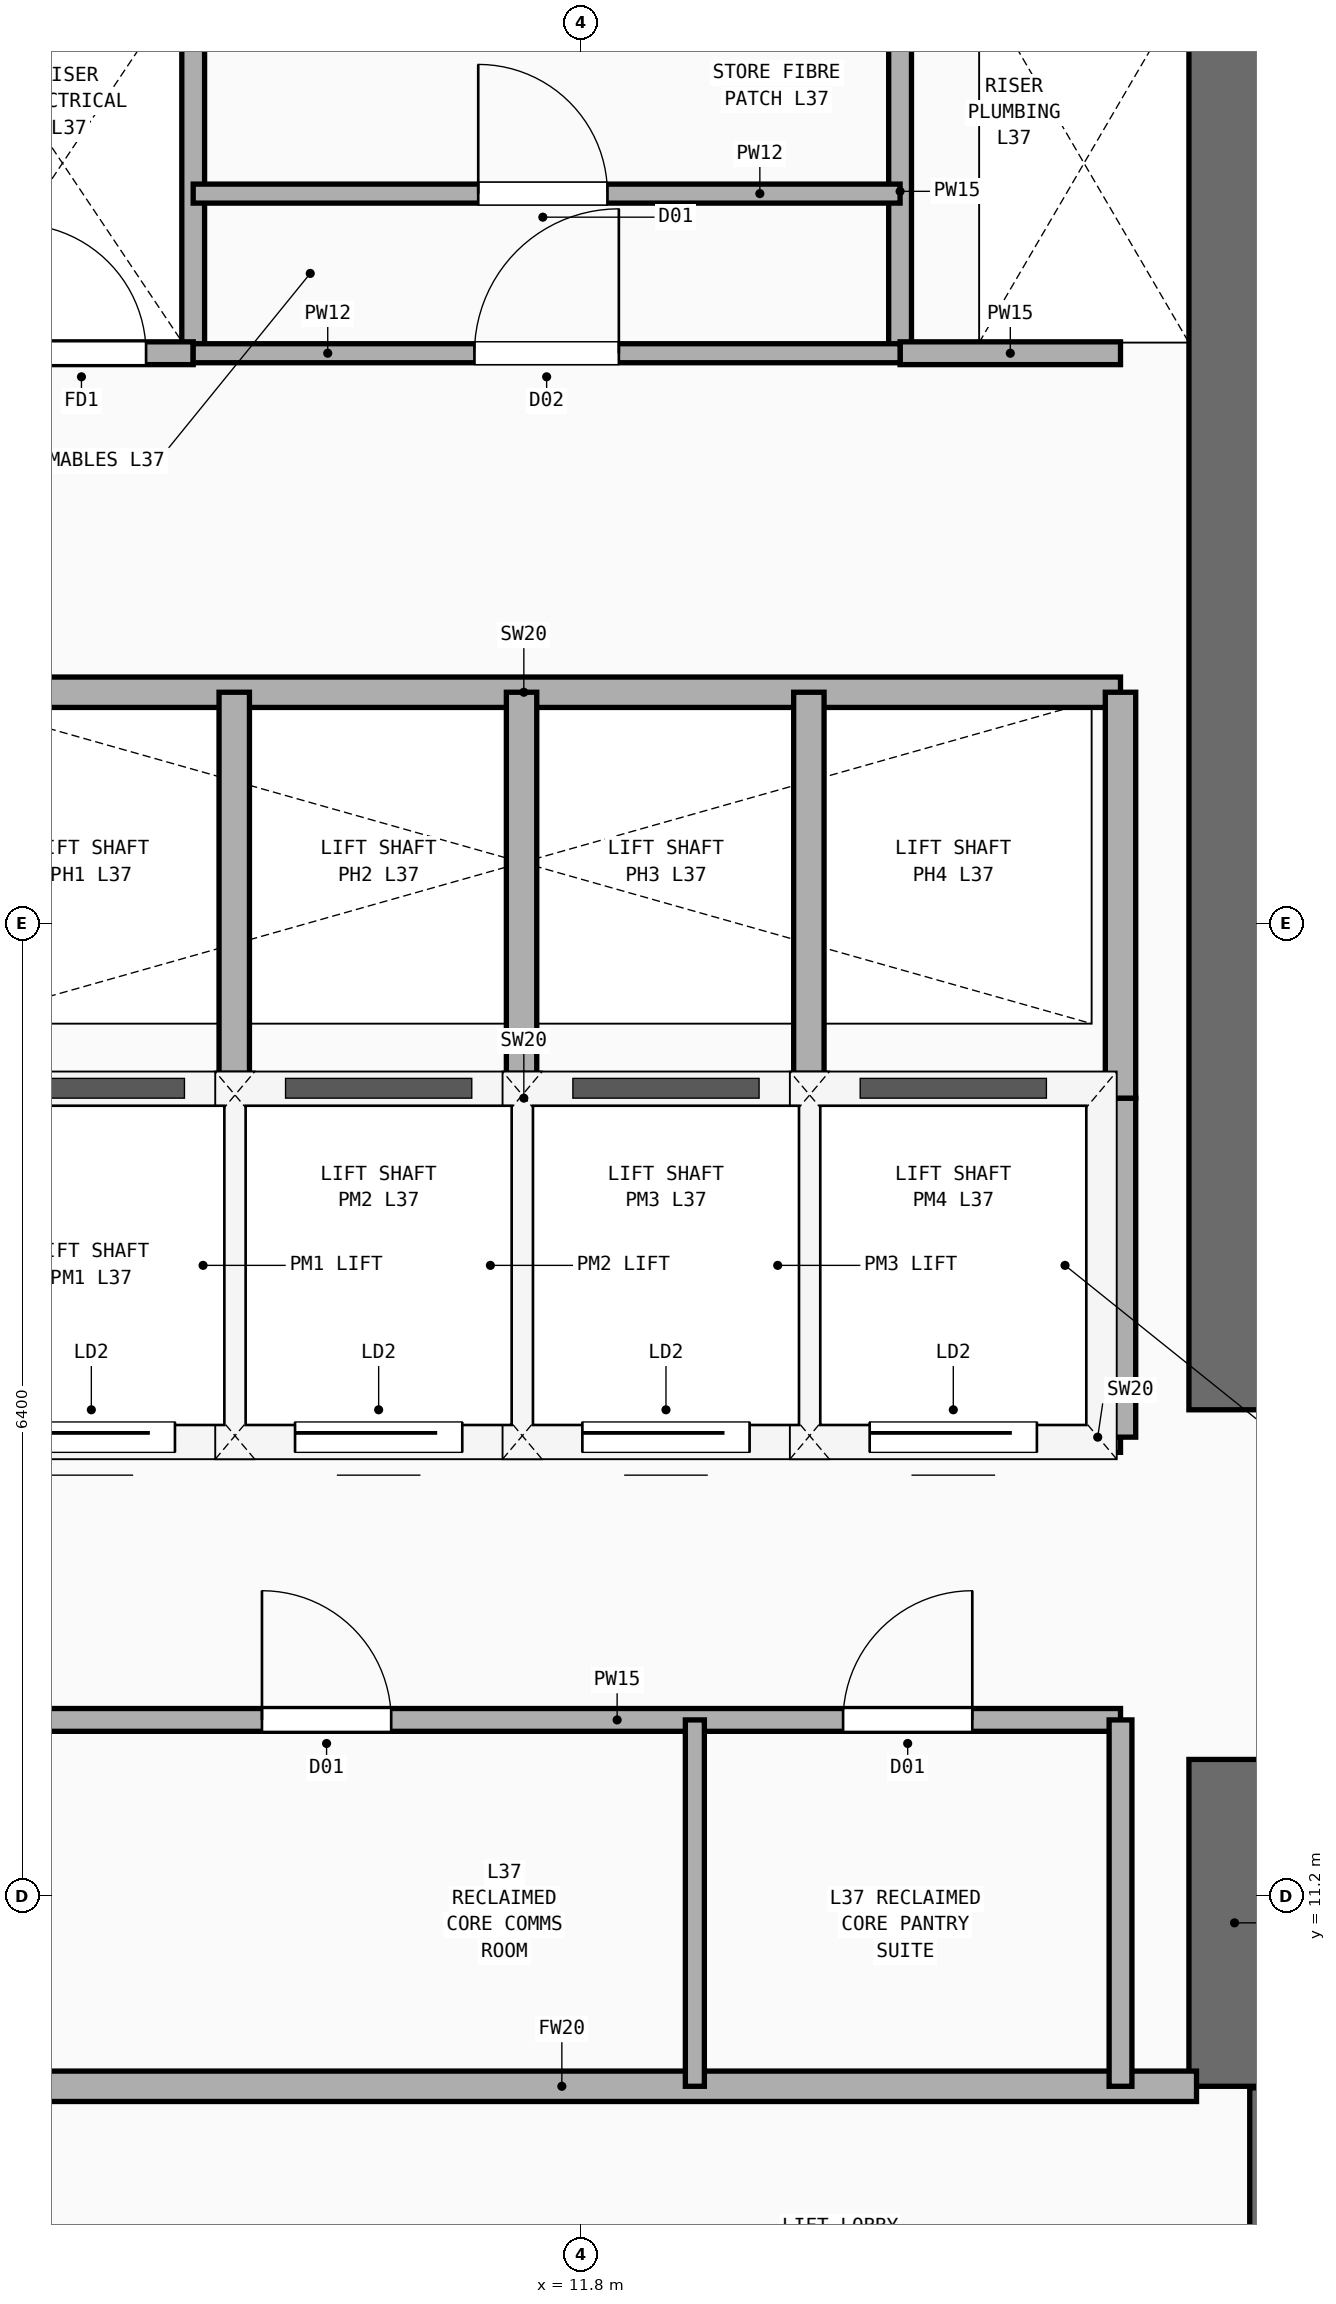
"""IFC4 building model, lengths in metres.
Left out: names, types, materials, properties, quantities, classifications, styles, units other than length and angle.
Written with IfcOpenShell. Run it as: python <this file> out.ifc"""

import sys

from ifc_helpers import new_model, si_unit, direction, frame, frame_2d, origin, place, context, subcontext, project, spatial, rectangle, extrude, element, fill, save


model = new_model("IFC4")
c1 = context("Model", 3, precision=1e-05, world=origin(), true_north=direction((0.0, 1.0)))
c2 = subcontext(c1, "Body", "Model", "MODEL_VIEW")
j1 = project(units=[si_unit("LENGTHUNIT", "METRE"), si_unit("PLANEANGLEUNIT", "RADIAN")], contexts=[c1])
p1 = place(None, origin())
s1 = spatial("IfcSite", under=j1, at=p1, CompositionType="ELEMENT")
p2 = place(p1, origin())
s2 = spatial("IfcBuilding", under=s1, at=p2, CompositionType="ELEMENT")
p3 = place(p2, frame((0.0, 0.0, 146.2)))
s3 = spatial("IfcBuildingStorey", under=s2, at=p3, CompositionType="ELEMENT", Elevation=146.2)
p4 = place(p3, frame((16.1, 9.95, 0.0), z_axis=(0.0, 0.0, 1.0), x_axis=(0.0, 1.0, 0.0)))
e1 = element("IfcWall", 1, at=p4, inside=s3, PredefinedType="SHEAR", context=c2, shape_type="SweptSolid", body=[
    extrude(rectangle(XDim=2.15, YDim=0.6, at=frame_2d((1.075, 0.0))), origin(), (0.0, 0.0, 1.0), 3.56),
])
p5 = place(p3, frame((16.1, 14.4, 0.0), z_axis=(0.0, 0.0, 1.0), x_axis=(0.0, 1.0, 0.0)))
e2 = element("IfcWall", 2, at=p5, inside=s3, PredefinedType="SHEAR", context=c2, shape_type="SweptSolid", body=[
    extrude(rectangle(XDim=9.1, YDim=0.6, at=frame_2d((4.55, 0.0))), origin(), (0.0, 0.0, 1.0), 3.56),
])
p6 = place(p3, frame((16.3, 7.36, 0.0), z_axis=(0.0, 0.0, 1.0), x_axis=(0.0, 1.0, 0.0)))
e3 = element("IfcWall", 3, at=p6, inside=s3, PredefinedType="SHEAR", context=c2, shape_type="SweptSolid", body=[
    extrude(rectangle(XDim=2.58, YDim=0.2, at=frame_2d((1.29, 0.0))), origin(), (0.0, 0.0, 1.0), 3.56),
])
p7 = place(p3, frame((7.5, 9.95, 0.0), z_axis=(0.0, 0.0, 1.0), x_axis=(1.0, 0.0, 0.0)))
e4 = element("IfcWall", 4, at=p7, inside=s3, PredefinedType="PARTITIONING", context=c2, shape_type="SweptSolid", body=[
    extrude(rectangle(XDim=8.35, YDim=0.2, at=frame_2d((4.175, 0.0))), origin(), (0.0, 0.0, 1.0), 3.56),
])
p8 = place(p3, frame((7.5, 12.36, 0.0), z_axis=(0.0, 0.0, 1.0), x_axis=(1.0, 0.0, 0.0)))
e5 = element("IfcWall", 5, at=p8, inside=s3, PredefinedType="PARTITIONING", context=c2, shape_type="SweptSolid", body=[
    extrude(rectangle(XDim=7.85, YDim=0.15, at=frame_2d((3.925, 0.0))), origin(), (0.0, 0.0, 1.0), 3.56),
])
p9 = place(p8, frame((2.202, 0.0, 0.0)))
e6 = element("IfcOpeningElement", 6, at=p9, cuts=e5, PredefinedType="OPENING", context=c2, shape_type="SweptSolid", body=[
    extrude(rectangle(XDim=0.85, YDim=2.15, at=frame_2d((0.425, 1.075))), frame((0.0, 0.085, 0.0), z_axis=(0.0, -1.0, 0.0), x_axis=(1.0, 0.0, 0.0)), (0.0, 0.0, 1.0), 0.17),
])
p10 = place(p8, frame((6.025, 0.0, 0.0)))
e7 = element("IfcOpeningElement", 7, at=p10, cuts=e5, PredefinedType="OPENING", context=c2, shape_type="SweptSolid", body=[
    extrude(rectangle(XDim=0.85, YDim=2.15, at=frame_2d((0.425, 1.075))), frame((0.0, 0.085, 0.0), z_axis=(0.0, -1.0, 0.0), x_axis=(1.0, 0.0, 0.0)), (0.0, 0.0, 1.0), 0.17),
])
p11 = place(p3, frame((15.35, 9.95, 0.0), z_axis=(0.0, 0.0, 1.0), x_axis=(0.0, 1.0, 0.0)))
e8 = element("IfcWall", 8, at=p11, inside=s3, PredefinedType="PARTITIONING", context=c2, shape_type="SweptSolid", body=[
    extrude(rectangle(XDim=2.41, YDim=0.15, at=frame_2d((1.205, 0.0))), origin(), (0.0, 0.0, 1.0), 3.56),
])
p12 = place(p3, frame((12.55, 9.95, 0.0), z_axis=(0.0, 0.0, 1.0), x_axis=(0.0, 1.0, 0.0)))
e9 = element("IfcWall", 9, at=p12, inside=s3, PredefinedType="PARTITIONING", context=c2, shape_type="SweptSolid", body=[
    extrude(rectangle(XDim=2.41, YDim=0.125, at=frame_2d((1.205, 0.0))), origin(), (0.0, 0.0, 1.0), 3.56),
])
p13 = place(p3, frame((7.5, 14.22, 0.0), z_axis=(0.0, 0.0, 1.0), x_axis=(1.0, 0.0, 0.0)))
e10 = element("IfcWall", 10, at=p13, inside=s3, PredefinedType="PARTITIONING", context=c2, shape_type="SweptSolid", body=[
    extrude(rectangle(XDim=7.85, YDim=0.2, at=frame_2d((3.925, 0.0))), origin(), (0.0, 0.0, 1.0), 3.56),
])
p14 = place(p13, frame((0.53, 0.0, 0.0)))
e11 = element("IfcOpeningElement", 11, at=p14, cuts=e10, PredefinedType="OPENING", context=c2, shape_type="SweptSolid", body=[
    extrude(rectangle(XDim=1.1, YDim=2.2, at=frame_2d((0.55, 1.1))), frame((0.0, 0.11, 0.0), z_axis=(0.0, -1.0, 0.0), x_axis=(1.0, 0.0, 0.0)), (0.0, 0.0, 1.0), 0.22),
])
p15 = place(p13, frame((2.42, 0.0, 0.0)))
e12 = element("IfcOpeningElement", 12, at=p15, cuts=e10, PredefinedType="OPENING", context=c2, shape_type="SweptSolid", body=[
    extrude(rectangle(XDim=1.1, YDim=2.2, at=frame_2d((0.55, 1.1))), frame((0.0, 0.11, 0.0), z_axis=(0.0, -1.0, 0.0), x_axis=(1.0, 0.0, 0.0)), (0.0, 0.0, 1.0), 0.22),
])
p16 = place(p13, frame((4.31, 0.0, 0.0)))
e13 = element("IfcOpeningElement", 13, at=p16, cuts=e10, PredefinedType="OPENING", context=c2, shape_type="SweptSolid", body=[
    extrude(rectangle(XDim=1.1, YDim=2.2, at=frame_2d((0.55, 1.1))), frame((0.0, 0.11, 0.0), z_axis=(0.0, -1.0, 0.0), x_axis=(1.0, 0.0, 0.0)), (0.0, 0.0, 1.0), 0.22),
])
p17 = place(p13, frame((6.2, 0.0, 0.0)))
e14 = element("IfcOpeningElement", 14, at=p17, cuts=e10, PredefinedType="OPENING", context=c2, shape_type="SweptSolid", body=[
    extrude(rectangle(XDim=1.1, YDim=2.2, at=frame_2d((0.55, 1.1))), frame((0.0, 0.11, 0.0), z_axis=(0.0, -1.0, 0.0), x_axis=(1.0, 0.0, 0.0)), (0.0, 0.0, 1.0), 0.22),
])
p18 = place(p3, frame((7.5, 16.45, 0.0), z_axis=(0.0, 0.0, 1.0), x_axis=(1.0, 0.0, 0.0)))
e15 = element("IfcWall", 15, at=p18, inside=s3, PredefinedType="PARTITIONING", context=c2, shape_type="SweptSolid", body=[
    extrude(rectangle(XDim=7.85, YDim=0.2, at=frame_2d((3.925, 0.0))), origin(), (0.0, 0.0, 1.0), 3.56),
])
for number, where, z_axis, x_axis in (
    (16, (15.35, 14.22, 0.0), (0.0, 0.0, 1.0), (0.0, 1.0, 0.0)),
    (17, (9.52, 14.22, 0.0), (0.0, 0.0, 1.0), (0.0, 1.0, 0.0)),
    (18, (11.41, 14.22, 0.0), (0.0, 0.0, 1.0), (0.0, 1.0, 0.0)),
    (19, (13.3, 14.22, 0.0), (0.0, 0.0, 1.0), (0.0, 1.0, 0.0)),
):
    element("IfcWall", number, at=place(p3, frame(where, z_axis=z_axis, x_axis=x_axis)), inside=s3, PredefinedType="PARTITIONING", context=c2, shape_type="SweptSolid", body=[
        extrude(rectangle(XDim=2.23, YDim=0.2, at=frame_2d((1.115, 0.0))), origin(), (0.0, 0.0, 1.0), 3.56),
    ])
p19 = place(p3, frame((7.5, 19.12, 0.0), z_axis=(0.0, 0.0, 1.0), x_axis=(1.0, 0.0, 0.0)))
e20 = element("IfcWall", 20, at=p19, inside=s3, PredefinedType="PARTITIONING", context=c2, shape_type="SweptSolid", body=[
    extrude(rectangle(XDim=7.85, YDim=0.2, at=frame_2d((3.925, 0.0))), origin(), (0.0, 0.0, 1.0), 3.56),
])
for number, where, z_axis, x_axis in (
    (21, (15.35, 16.45, 0.0), (0.0, 0.0, 1.0), (0.0, 1.0, 0.0)),
    (22, (9.52, 16.45, 0.0), (0.0, 0.0, 1.0), (0.0, 1.0, 0.0)),
    (23, (11.41, 16.45, 0.0), (0.0, 0.0, 1.0), (0.0, 1.0, 0.0)),
    (24, (13.3, 16.45, 0.0), (0.0, 0.0, 1.0), (0.0, 1.0, 0.0)),
):
    element("IfcWall", number, at=place(p3, frame(where, z_axis=z_axis, x_axis=x_axis)), inside=s3, PredefinedType="PARTITIONING", context=c2, shape_type="SweptSolid", body=[
        extrude(rectangle(XDim=2.67, YDim=0.2, at=frame_2d((1.335, 0.0))), origin(), (0.0, 0.0, 1.0), 3.56),
    ])
for number, where, z_axis, x_axis in (
    (25, (9.25, 21.35, 0.0), (0.0, 0.0, 1.0), (0.0, 1.0, 0.0)),
    (26, (13.9, 21.35, 0.0), (0.0, 0.0, 1.0), (0.0, 1.0, 0.0)),
):
    element("IfcWall", number, at=place(p3, frame(where, z_axis=z_axis, x_axis=x_axis)), inside=s3, PredefinedType="PARTITIONING", context=c2, shape_type="SweptSolid", body=[
        extrude(rectangle(XDim=2.13, YDim=0.15, at=frame_2d((1.065, 0.0))), origin(), (0.0, 0.0, 1.0), 3.56),
    ])
p20 = place(p3, frame((7.7, 21.35, 0.0), z_axis=(0.0, 0.0, 1.0), x_axis=(1.0, 0.0, 0.0)))
e27 = element("IfcWall", 27, at=p20, inside=s3, PredefinedType="PARTITIONING", context=c2, shape_type="SweptSolid", body=[
    extrude(rectangle(XDim=1.55, YDim=0.15, at=frame_2d((0.775, 0.0))), origin(), (0.0, 0.0, 1.0), 3.56),
])
p21 = place(p20, frame((0.39, 0.0, 0.0)))
e28 = element("IfcOpeningElement", 28, at=p21, cuts=e27, PredefinedType="OPENING", context=c2, shape_type="SweptSolid", body=[
    extrude(rectangle(XDim=0.85, YDim=2.15, at=frame_2d((0.425, 1.075))), frame((0.0, 0.085, 0.0), z_axis=(0.0, -1.0, 0.0), x_axis=(1.0, 0.0, 0.0)), (0.0, 0.0, 1.0), 0.17),
])
p22 = place(p3, frame((13.9, 21.35, 0.0), z_axis=(0.0, 0.0, 1.0), x_axis=(1.0, 0.0, 0.0)))
e29 = element("IfcWall", 29, at=p22, inside=s3, PredefinedType="PARTITIONING", context=c2, shape_type="SweptSolid", body=[
    extrude(rectangle(XDim=1.45, YDim=0.15, at=frame_2d((0.725, 0.0))), origin(), (0.0, 0.0, 1.0), 3.56),
])
p23 = place(p3, frame((9.25, 21.35, 0.0), z_axis=(0.0, 0.0, 1.0), x_axis=(1.0, 0.0, 0.0)))
e30 = element("IfcWall", 30, at=p23, inside=s3, PredefinedType="PARTITIONING", context=c2, shape_type="SweptSolid", body=[
    extrude(rectangle(XDim=4.65, YDim=0.125, at=frame_2d((2.325, 0.0))), origin(), (0.0, 0.0, 1.0), 3.56),
])
p24 = place(p23, frame((1.85, 0.0, 0.0)))
e31 = element("IfcOpeningElement", 31, at=p24, cuts=e30, PredefinedType="OPENING", context=c2, shape_type="SweptSolid", body=[
    extrude(rectangle(XDim=0.95, YDim=2.15, at=frame_2d((0.475, 1.075))), frame((0.0, 0.073, 0.0), z_axis=(0.0, -1.0, 0.0), x_axis=(1.0, 0.0, 0.0)), (0.0, 0.0, 1.0), 0.145),
])
p25 = place(p3, frame((9.25, 22.4, 0.0), z_axis=(0.0, 0.0, 1.0), x_axis=(1.0, 0.0, 0.0)))
e32 = element("IfcWall", 32, at=p25, inside=s3, PredefinedType="PARTITIONING", context=c2, shape_type="SweptSolid", body=[
    extrude(rectangle(XDim=4.65, YDim=0.125, at=frame_2d((2.325, 0.0))), origin(), (0.0, 0.0, 1.0), 3.56),
])
p26 = place(p25, frame((1.875, 0.0, 0.0)))
e33 = element("IfcOpeningElement", 33, at=p26, cuts=e32, PredefinedType="OPENING", context=c2, shape_type="SweptSolid", body=[
    extrude(rectangle(XDim=0.85, YDim=2.15, at=frame_2d((0.425, 1.075))), frame((0.0, 0.073, 0.0), z_axis=(0.0, -1.0, 0.0), x_axis=(1.0, 0.0, 0.0)), (0.0, 0.0, 1.0), 0.145),
])
p27 = place(p9, origin())
e34 = element("IfcDoor", 34, at=p27, inside=s3, OperationType="SINGLE_SWING_LEFT", PredefinedType="DOOR", context=c2, shape_type="SweptSolid", body=[
    extrude(rectangle(XDim=0.85, YDim=2.15, at=frame_2d((0.425, 1.075))), frame((0.0, 0.025, 0.0), z_axis=(0.0, -1.0, 0.0), x_axis=(1.0, 0.0, 0.0)), (0.0, 0.0, 1.0), 0.05),
])
fill(e6, e34)
p28 = place(p10, origin())
e35 = element("IfcDoor", 35, at=p28, inside=s3, OperationType="SINGLE_SWING_RIGHT", PredefinedType="DOOR", context=c2, shape_type="SweptSolid", body=[
    extrude(rectangle(XDim=0.85, YDim=2.15, at=frame_2d((0.425, 1.075))), frame((0.0, 0.025, 0.0), z_axis=(0.0, -1.0, 0.0), x_axis=(1.0, 0.0, 0.0)), (0.0, 0.0, 1.0), 0.05),
])
fill(e7, e35)
p29 = place(p14, frame((1.1, 0.0, 0.0), z_axis=(0.0, 0.0, 1.0), x_axis=(-1.0, 0.0, 0.0)))
e36 = element("IfcDoor", 36, at=p29, inside=s3, OperationType="SLIDING_TO_LEFT", PredefinedType="DOOR", context=c2, shape_type="SweptSolid", body=[
    extrude(rectangle(XDim=1.1, YDim=2.2, at=frame_2d((0.55, 1.1))), frame((0.0, 0.025, 0.0), z_axis=(0.0, -1.0, 0.0), x_axis=(1.0, 0.0, 0.0)), (0.0, 0.0, 1.0), 0.05),
])
fill(e11, e36)
p30 = place(p15, frame((1.1, 0.0, 0.0), z_axis=(0.0, 0.0, 1.0), x_axis=(-1.0, 0.0, 0.0)))
e37 = element("IfcDoor", 37, at=p30, inside=s3, OperationType="SLIDING_TO_LEFT", PredefinedType="DOOR", context=c2, shape_type="SweptSolid", body=[
    extrude(rectangle(XDim=1.1, YDim=2.2, at=frame_2d((0.55, 1.1))), frame((0.0, 0.025, 0.0), z_axis=(0.0, -1.0, 0.0), x_axis=(1.0, 0.0, 0.0)), (0.0, 0.0, 1.0), 0.05),
])
fill(e12, e37)
p31 = place(p16, frame((1.1, 0.0, 0.0), z_axis=(0.0, 0.0, 1.0), x_axis=(-1.0, 0.0, 0.0)))
e38 = element("IfcDoor", 38, at=p31, inside=s3, OperationType="SLIDING_TO_LEFT", PredefinedType="DOOR", context=c2, shape_type="SweptSolid", body=[
    extrude(rectangle(XDim=1.1, YDim=2.2, at=frame_2d((0.55, 1.1))), frame((0.0, 0.025, 0.0), z_axis=(0.0, -1.0, 0.0), x_axis=(1.0, 0.0, 0.0)), (0.0, 0.0, 1.0), 0.05),
])
fill(e13, e38)
p32 = place(p17, frame((1.1, 0.0, 0.0), z_axis=(0.0, 0.0, 1.0), x_axis=(-1.0, 0.0, 0.0)))
e39 = element("IfcDoor", 39, at=p32, inside=s3, OperationType="SLIDING_TO_LEFT", PredefinedType="DOOR", context=c2, shape_type="SweptSolid", body=[
    extrude(rectangle(XDim=1.1, YDim=2.2, at=frame_2d((0.55, 1.1))), frame((0.0, 0.025, 0.0), z_axis=(0.0, -1.0, 0.0), x_axis=(1.0, 0.0, 0.0)), (0.0, 0.0, 1.0), 0.05),
])
fill(e14, e39)
p33 = place(p21, origin())
e40 = element("IfcDoor", 40, at=p33, inside=s3, OperationType="SINGLE_SWING_LEFT", PredefinedType="DOOR", context=c2, shape_type="SweptSolid", body=[
    extrude(rectangle(XDim=0.85, YDim=2.15, at=frame_2d((0.425, 1.075))), frame((0.0, 0.025, 0.0), z_axis=(0.0, -1.0, 0.0), x_axis=(1.0, 0.0, 0.0)), (0.0, 0.0, 1.0), 0.05),
])
fill(e28, e40)
p34 = place(p24, origin())
e41 = element("IfcDoor", 41, at=p34, inside=s3, OperationType="SINGLE_SWING_RIGHT", PredefinedType="DOOR", context=c2, shape_type="SweptSolid", body=[
    extrude(rectangle(XDim=0.95, YDim=2.15, at=frame_2d((0.475, 1.075))), frame((0.0, 0.025, 0.0), z_axis=(0.0, -1.0, 0.0), x_axis=(1.0, 0.0, 0.0)), (0.0, 0.0, 1.0), 0.05),
])
fill(e31, e41)
p35 = place(p26, origin())
e42 = element("IfcDoor", 42, at=p35, inside=s3, OperationType="SINGLE_SWING_LEFT", PredefinedType="DOOR", context=c2, shape_type="SweptSolid", body=[
    extrude(rectangle(XDim=0.85, YDim=2.15, at=frame_2d((0.425, 1.075))), frame((0.0, 0.025, 0.0), z_axis=(0.0, -1.0, 0.0), x_axis=(1.0, 0.0, 0.0)), (0.0, 0.0, 1.0), 0.05),
])
fill(e33, e42)
save(model, sys.argv[1])
